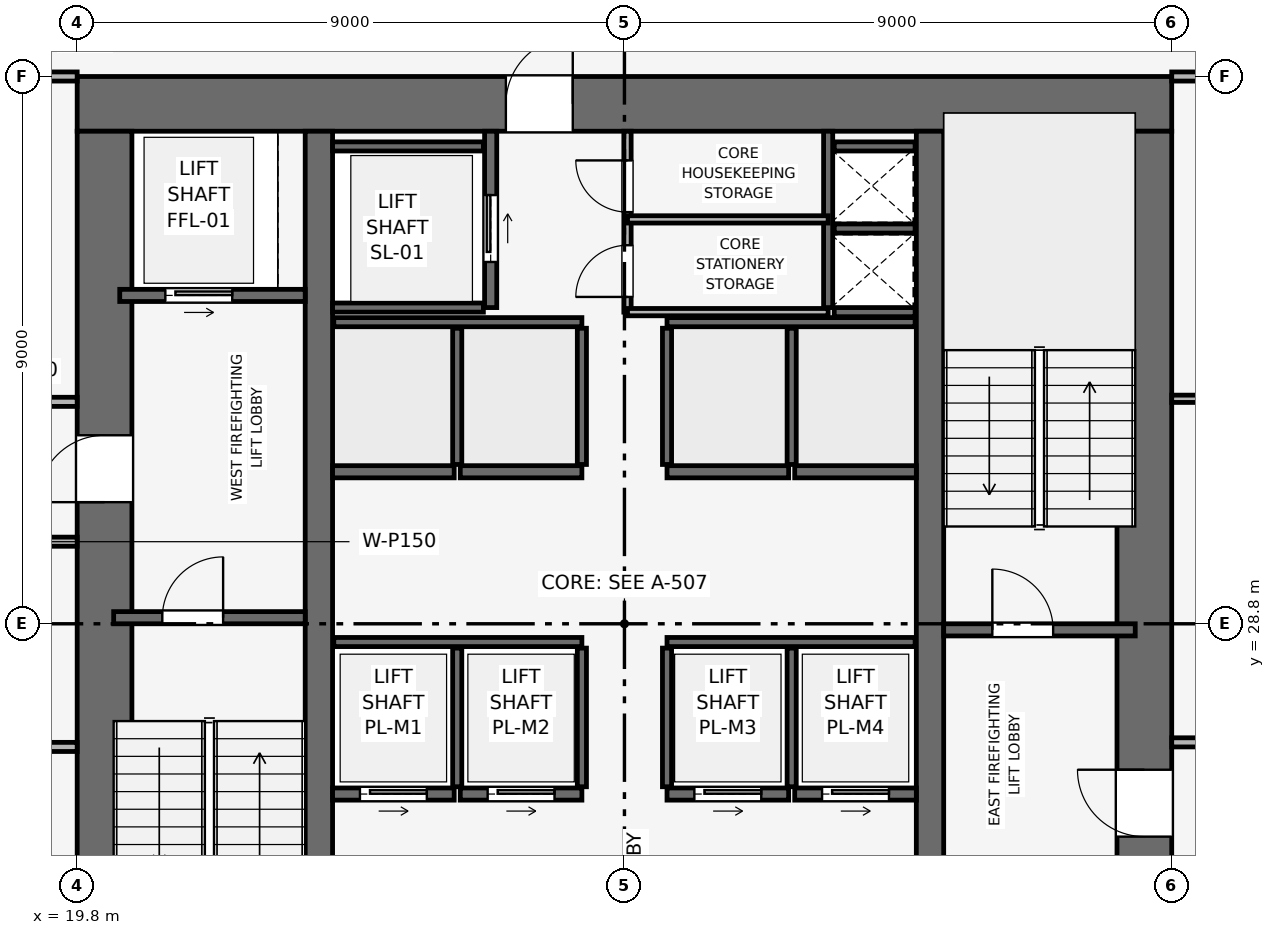
"""IFC4 building model, lengths in metres.
Left out: names, types, materials, properties, quantities, classifications, styles, units other than length and angle.
Written with IfcOpenShell. Run it as: python <this file> out.ifc"""

import sys

from ifc_helpers import new_model, si_unit, direction, frame, frame_2d, origin, place, context, subcontext, project, spatial, rectangle, extrude, element, fill, save


model = new_model("IFC4")
c1 = context("Model", 3, precision=1e-05, world=origin(), true_north=direction((0.0, 1.0)))
c2 = subcontext(c1, "Body", "Model", "MODEL_VIEW")
j1 = project(units=[si_unit("LENGTHUNIT", "METRE"), si_unit("PLANEANGLEUNIT", "RADIAN")], contexts=[c1])
p1 = place(None, origin())
s1 = spatial("IfcSite", under=j1, at=p1, CompositionType="ELEMENT")
p2 = place(p1, origin())
s2 = spatial("IfcBuilding", under=s1, at=p2, CompositionType="ELEMENT")
p3 = place(p2, frame((0.0, 0.0, 142.05)))
s3 = spatial("IfcBuildingStorey", under=s2, at=p3, CompositionType="ELEMENT", Elevation=142.05)
p4 = place(p3, frame((19.8, 37.35, 0.0), z_axis=(0.0, 0.0, 1.0), x_axis=(1.0, 0.0, 0.0)))
e1 = element("IfcWall", 1, at=p4, inside=s3, PredefinedType="SHEAR", context=c2, shape_type="SweptSolid", body=[
    extrude(rectangle(XDim=18.0, YDim=0.9, at=frame_2d((9.0, 0.0))), origin(), (0.0, 0.0, 1.0), 3.75),
])
p5 = place(p4, frame((7.05, 0.0, 0.0)))
e2 = element("IfcOpeningElement", 2, at=p5, cuts=e1, PredefinedType="OPENING", context=c2, shape_type="SweptSolid", body=[
    extrude(rectangle(XDim=1.1, YDim=2.15, at=frame_2d((0.55, 1.075))), frame((0.0, 0.46, 0.0), z_axis=(0.0, -1.0, 0.0), x_axis=(1.0, 0.0, 0.0)), (0.0, 0.0, 1.0), 0.92),
])
p6 = place(p3, frame((20.25, 20.7, 0.0), z_axis=(0.0, 0.0, 1.0), x_axis=(0.0, 1.0, 0.0)))
e3 = element("IfcWall", 3, at=p6, inside=s3, PredefinedType="SHEAR", context=c2, shape_type="SweptSolid", body=[
    extrude(rectangle(XDim=16.2, YDim=0.9, at=frame_2d((8.1, 0.0))), origin(), (0.0, 0.0, 1.0), 3.75),
])
p7 = place(p6, frame((10.1, 0.0, 0.0)))
e4 = element("IfcOpeningElement", 4, at=p7, cuts=e3, PredefinedType="OPENING", context=c2, shape_type="SweptSolid", body=[
    extrude(rectangle(XDim=1.1, YDim=2.15, at=frame_2d((0.55, 1.075))), frame((0.0, 0.46, 0.0), z_axis=(0.0, -1.0, 0.0), x_axis=(1.0, 0.0, 0.0)), (0.0, 0.0, 1.0), 0.92),
])
p8 = place(p3, frame((37.35, 20.7, 0.0), z_axis=(0.0, 0.0, 1.0), x_axis=(0.0, 1.0, 0.0)))
e5 = element("IfcWall", 5, at=p8, inside=s3, PredefinedType="SHEAR", context=c2, shape_type="SweptSolid", body=[
    extrude(rectangle(XDim=16.2, YDim=0.9, at=frame_2d((8.1, 0.0))), origin(), (0.0, 0.0, 1.0), 3.75),
])
p9 = place(p8, frame((4.6, 0.0, 0.0)))
e6 = element("IfcOpeningElement", 6, at=p9, cuts=e5, PredefinedType="OPENING", context=c2, shape_type="SweptSolid", body=[
    extrude(rectangle(XDim=1.1, YDim=2.15, at=frame_2d((0.55, 1.075))), frame((0.0, 0.46, 0.0), z_axis=(0.0, -1.0, 0.0), x_axis=(1.0, 0.0, 0.0)), (0.0, 0.0, 1.0), 0.92),
])
for number, where, z_axis, x_axis in (
    (7, (23.775, 20.7, 0.0), (0.0, 0.0, 1.0), (0.0, 1.0, 0.0)),
    (8, (33.825, 20.7, 0.0), (0.0, 0.0, 1.0), (0.0, 1.0, 0.0)),
):
    element("IfcWall", number, at=place(p3, frame(where, z_axis=z_axis, x_axis=x_axis)), inside=s3, PredefinedType="SHEAR", context=c2, shape_type="SweptSolid", body=[
        extrude(rectangle(XDim=16.2, YDim=0.45, at=frame_2d((8.1, 0.0))), origin(), (0.0, 0.0, 1.0), 3.75),
    ])
p10 = place(p3, frame((20.4, 28.9, 0.0), z_axis=(0.0, 0.0, 1.0), x_axis=(1.0, 0.0, 0.0)))
e9 = element("IfcWall", 9, at=p10, inside=s3, PredefinedType="SHEAR", context=c2, shape_type="SweptSolid", body=[
    extrude(rectangle(XDim=3.15, YDim=0.2, at=frame_2d((1.575, 0.0))), origin(), (0.0, 0.0, 1.0), 3.495),
])
p11 = place(p10, frame((0.8, 0.0, 0.0)))
e10 = element("IfcOpeningElement", 10, at=p11, cuts=e9, PredefinedType="OPENING", context=c2, shape_type="SweptSolid", body=[
    extrude(rectangle(XDim=1.0, YDim=2.1, at=frame_2d((0.5, 1.05))), frame((0.0, 0.11, 0.0), z_axis=(0.0, -1.0, 0.0), x_axis=(1.0, 0.0, 0.0)), (0.0, 0.0, 1.0), 0.22),
])
p12 = place(p3, frame((34.05, 28.7, 0.0), z_axis=(0.0, 0.0, 1.0), x_axis=(1.0, 0.0, 0.0)))
e11 = element("IfcWall", 11, at=p12, inside=s3, PredefinedType="SHEAR", context=c2, shape_type="SweptSolid", body=[
    extrude(rectangle(XDim=3.15, YDim=0.2, at=frame_2d((1.575, 0.0))), origin(), (0.0, 0.0, 1.0), 3.495),
])
p13 = place(p12, frame((0.8, 0.0, 0.0)))
e12 = element("IfcOpeningElement", 12, at=p13, cuts=e11, PredefinedType="OPENING", context=c2, shape_type="SweptSolid", body=[
    extrude(rectangle(XDim=1.0, YDim=2.1, at=frame_2d((0.5, 1.05))), frame((0.0, 0.11, 0.0), z_axis=(0.0, -1.0, 0.0), x_axis=(1.0, 0.0, 0.0)), (0.0, 0.0, 1.0), 0.22),
])
p14 = place(p3, frame((32.15, 34.0, 0.0), z_axis=(0.0, 0.0, 1.0), x_axis=(0.0, 1.0, 0.0)))
e13 = element("IfcWall", 13, at=p14, inside=s3, PredefinedType="SHEAR", context=c2, shape_type="SweptSolid", body=[
    extrude(rectangle(XDim=2.9, YDim=0.15, at=frame_2d((1.45, 0.0))), origin(), (0.0, 0.0, 1.0), 3.495),
])
for number, where, z_axis, x_axis in (
    (14, (32.25, 33.925, 0.0), (0.0, 0.0, 1.0), (1.0, 0.0, 0.0)),
    (15, (32.25, 35.3, 0.0), (0.0, 0.0, 1.0), (1.0, 0.0, 0.0)),
):
    element("IfcWall", number, at=place(p3, frame(where, z_axis=z_axis, x_axis=x_axis)), inside=s3, PredefinedType="SHEAR", context=c2, shape_type="SweptSolid", body=[
        extrude(rectangle(XDim=1.33, YDim=0.15, at=frame_2d((0.665, 0.0))), origin(), (0.0, 0.0, 1.0), 3.495),
    ])
p15 = place(p3, frame((20.5, 34.2, 0.0), z_axis=(0.0, 0.0, 1.0), x_axis=(1.0, 0.0, 0.0)))
e16 = element("IfcWall", 16, at=p15, inside=s3, PredefinedType="SHEAR", context=c2, shape_type="SweptSolid", body=[
    extrude(rectangle(XDim=3.05, YDim=0.2, at=frame_2d((1.525, 0.0))), origin(), (0.0, 0.0, 1.0), 3.495),
])
p16 = place(p15, frame((0.75, 0.0, 0.0)))
e17 = element("IfcOpeningElement", 17, at=p16, cuts=e16, PredefinedType="OPENING", context=c2, shape_type="SweptSolid", body=[
    extrude(rectangle(XDim=1.1, YDim=2.15, at=frame_2d((0.55, 1.075))), frame((0.0, 0.11, 0.0), z_axis=(0.0, -1.0, 0.0), x_axis=(1.0, 0.0, 0.0)), (0.0, 0.0, 1.0), 0.22),
])
p17 = place(p3, frame((26.6, 34.0, 0.0), z_axis=(0.0, 0.0, 1.0), x_axis=(0.0, 1.0, 0.0)))
e18 = element("IfcWall", 18, at=p17, inside=s3, PredefinedType="SHEAR", context=c2, shape_type="SweptSolid", body=[
    extrude(rectangle(XDim=2.9, YDim=0.2, at=frame_2d((1.45, 0.0))), origin(), (0.0, 0.0, 1.0), 3.495),
])
p18 = place(p17, frame((0.75, 0.0, 0.0)))
e19 = element("IfcOpeningElement", 19, at=p18, cuts=e18, PredefinedType="OPENING", context=c2, shape_type="SweptSolid", body=[
    extrude(rectangle(XDim=1.1, YDim=2.15, at=frame_2d((0.55, 1.075))), frame((0.0, 0.11, 0.0), z_axis=(0.0, -1.0, 0.0), x_axis=(1.0, 0.0, 0.0)), (0.0, 0.0, 1.0), 0.22),
])
for number, where, z_axis, x_axis in (
    (20, (24.0, 34.0, 0.0), (0.0, 0.0, 1.0), (1.0, 0.0, 0.0)),
    (21, (24.0, 36.65, 0.0), (0.0, 0.0, 1.0), (1.0, 0.0, 0.0)),
):
    element("IfcWall", number, at=place(p3, frame(where, z_axis=z_axis, x_axis=x_axis)), inside=s3, PredefinedType="SHEAR", context=c2, shape_type="SweptSolid", body=[
        extrude(rectangle(XDim=2.48, YDim=0.15, at=frame_2d((1.24, 0.0))), origin(), (0.0, 0.0, 1.0), 3.495),
    ])
p19 = place(p3, frame((24.0, 26.0, 0.0), z_axis=(0.0, 0.0, 1.0), x_axis=(1.0, 0.0, 0.0)))
e22 = element("IfcWall", 22, at=p19, inside=s3, PredefinedType="SHEAR", context=c2, shape_type="SweptSolid", body=[
    extrude(rectangle(XDim=2.0, YDim=0.2, at=frame_2d((1.0, 0.0))), origin(), (0.0, 0.0, 1.0), 3.495),
])
p20 = place(p19, frame((0.45, 0.0, 0.0)))
e23 = element("IfcOpeningElement", 23, at=p20, cuts=e22, PredefinedType="OPENING", context=c2, shape_type="SweptSolid", body=[
    extrude(rectangle(XDim=1.1, YDim=2.15, at=frame_2d((0.55, 1.075))), frame((0.0, 0.11, 0.0), z_axis=(0.0, -1.0, 0.0), x_axis=(1.0, 0.0, 0.0)), (0.0, 0.0, 1.0), 0.22),
])
p21 = place(p3, frame((26.1, 26.0, 0.0), z_axis=(0.0, 0.0, 1.0), x_axis=(1.0, 0.0, 0.0)))
e24 = element("IfcWall", 24, at=p21, inside=s3, PredefinedType="SHEAR", context=c2, shape_type="SweptSolid", body=[
    extrude(rectangle(XDim=2.0, YDim=0.2, at=frame_2d((1.0, 0.0))), origin(), (0.0, 0.0, 1.0), 3.495),
])
p22 = place(p21, frame((0.45, 0.0, 0.0)))
e25 = element("IfcOpeningElement", 25, at=p22, cuts=e24, PredefinedType="OPENING", context=c2, shape_type="SweptSolid", body=[
    extrude(rectangle(XDim=1.1, YDim=2.15, at=frame_2d((0.55, 1.075))), frame((0.0, 0.11, 0.0), z_axis=(0.0, -1.0, 0.0), x_axis=(1.0, 0.0, 0.0)), (0.0, 0.0, 1.0), 0.22),
])
p23 = place(p3, frame((29.5, 26.0, 0.0), z_axis=(0.0, 0.0, 1.0), x_axis=(1.0, 0.0, 0.0)))
e26 = element("IfcWall", 26, at=p23, inside=s3, PredefinedType="SHEAR", context=c2, shape_type="SweptSolid", body=[
    extrude(rectangle(XDim=2.0, YDim=0.2, at=frame_2d((1.0, 0.0))), origin(), (0.0, 0.0, 1.0), 3.495),
])
p24 = place(p23, frame((0.45, 0.0, 0.0)))
e27 = element("IfcOpeningElement", 27, at=p24, cuts=e26, PredefinedType="OPENING", context=c2, shape_type="SweptSolid", body=[
    extrude(rectangle(XDim=1.1, YDim=2.15, at=frame_2d((0.55, 1.075))), frame((0.0, 0.11, 0.0), z_axis=(0.0, -1.0, 0.0), x_axis=(1.0, 0.0, 0.0)), (0.0, 0.0, 1.0), 0.22),
])
p25 = place(p3, frame((31.6, 26.0, 0.0), z_axis=(0.0, 0.0, 1.0), x_axis=(1.0, 0.0, 0.0)))
e28 = element("IfcWall", 28, at=p25, inside=s3, PredefinedType="SHEAR", context=c2, shape_type="SweptSolid", body=[
    extrude(rectangle(XDim=2.0, YDim=0.2, at=frame_2d((1.0, 0.0))), origin(), (0.0, 0.0, 1.0), 3.495),
])
p26 = place(p25, frame((0.45, 0.0, 0.0)))
e29 = element("IfcOpeningElement", 29, at=p26, cuts=e28, PredefinedType="OPENING", context=c2, shape_type="SweptSolid", body=[
    extrude(rectangle(XDim=1.1, YDim=2.15, at=frame_2d((0.55, 1.075))), frame((0.0, 0.11, 0.0), z_axis=(0.0, -1.0, 0.0), x_axis=(1.0, 0.0, 0.0)), (0.0, 0.0, 1.0), 0.22),
])
for number, where, z_axis, x_axis in (
    (30, (24.0, 31.3, 0.0), (0.0, 0.0, 1.0), (1.0, 0.0, 0.0)),
    (31, (26.1, 31.3, 0.0), (0.0, 0.0, 1.0), (1.0, 0.0, 0.0)),
    (32, (29.5, 31.3, 0.0), (0.0, 0.0, 1.0), (1.0, 0.0, 0.0)),
    (33, (31.6, 31.3, 0.0), (0.0, 0.0, 1.0), (1.0, 0.0, 0.0)),
):
    element("IfcWall", number, at=place(p3, frame(where, z_axis=z_axis, x_axis=x_axis)), inside=s3, PredefinedType="SHEAR", context=c2, shape_type="SweptSolid", body=[
        extrude(rectangle(XDim=2.0, YDim=0.2, at=frame_2d((1.0, 0.0))), origin(), (0.0, 0.0, 1.0), 3.495),
    ])
p27 = place(p3, frame((32.25, 36.65, 0.0), z_axis=(0.0, 0.0, 1.0), x_axis=(1.0, 0.0, 0.0)))
e34 = element("IfcWall", 34, at=p27, inside=s3, PredefinedType="SHEAR", context=c2, shape_type="SweptSolid", body=[
    extrude(rectangle(XDim=1.33, YDim=0.15, at=frame_2d((0.665, 0.0))), origin(), (0.0, 0.0, 1.0), 3.495),
])
for number, where, z_axis, x_axis in (
    (35, (24.02, 28.5, 0.0), (0.0, 0.0, 1.0), (1.0, 0.0, 0.0)),
    (36, (29.5, 28.5, 0.0), (0.0, 0.0, 1.0), (1.0, 0.0, 0.0)),
):
    element("IfcWall", number, at=place(p3, frame(where, z_axis=z_axis, x_axis=x_axis)), inside=s3, PredefinedType="SHEAR", context=c2, shape_type="SweptSolid", body=[
        extrude(rectangle(XDim=4.08, YDim=0.15, at=frame_2d((2.04, 0.0))), origin(), (0.0, 0.0, 1.0), 3.495),
    ])
for number, where, z_axis, x_axis in (
    (37, (26.05, 26.12, 0.0), (0.0, 0.0, 1.0), (0.0, 1.0, 0.0)),
    (38, (28.1, 26.12, 0.0), (0.0, 0.0, 1.0), (0.0, 1.0, 0.0)),
    (39, (29.5, 26.12, 0.0), (0.0, 0.0, 1.0), (0.0, 1.0, 0.0)),
    (40, (31.55, 26.12, 0.0), (0.0, 0.0, 1.0), (0.0, 1.0, 0.0)),
):
    element("IfcWall", number, at=place(p3, frame(where, z_axis=z_axis, x_axis=x_axis)), inside=s3, PredefinedType="SHEAR", context=c2, shape_type="SweptSolid", body=[
        extrude(rectangle(XDim=2.28, YDim=0.15, at=frame_2d((1.14, 0.0))), origin(), (0.0, 0.0, 1.0), 3.495),
    ])
for number, where, z_axis, x_axis in (
    (41, (24.02, 33.76, 0.0), (0.0, 0.0, 1.0), (1.0, 0.0, 0.0)),
    (42, (29.5, 33.76, 0.0), (0.0, 0.0, 1.0), (1.0, 0.0, 0.0)),
):
    element("IfcWall", number, at=place(p3, frame(where, z_axis=z_axis, x_axis=x_axis)), inside=s3, PredefinedType="SHEAR", context=c2, shape_type="SweptSolid", body=[
        extrude(rectangle(XDim=4.08, YDim=0.15, at=frame_2d((2.04, 0.0))), origin(), (0.0, 0.0, 1.0), 3.495),
    ])
for number, where, z_axis, x_axis in (
    (43, (26.05, 31.42, 0.0), (0.0, 0.0, 1.0), (0.0, 1.0, 0.0)),
    (44, (28.1, 31.42, 0.0), (0.0, 0.0, 1.0), (0.0, 1.0, 0.0)),
    (45, (29.5, 31.42, 0.0), (0.0, 0.0, 1.0), (0.0, 1.0, 0.0)),
    (46, (31.55, 31.42, 0.0), (0.0, 0.0, 1.0), (0.0, 1.0, 0.0)),
):
    element("IfcWall", number, at=place(p3, frame(where, z_axis=z_axis, x_axis=x_axis)), inside=s3, PredefinedType="SHEAR", context=c2, shape_type="SweptSolid", body=[
        extrude(rectangle(XDim=2.24, YDim=0.15, at=frame_2d((1.12, 0.0))), origin(), (0.0, 0.0, 1.0), 3.495),
    ])
p28 = place(p3, frame((28.85, 33.925, 0.0), z_axis=(0.0, 0.0, 1.0), x_axis=(0.0, 1.0, 0.0)))
e47 = element("IfcWall", 47, at=p28, inside=s3, PredefinedType="PARTITIONING", context=c2, shape_type="SweptSolid", body=[
    extrude(rectangle(XDim=2.975, YDim=0.12, at=frame_2d((1.487, 0.0))), origin(), (0.0, 0.0, 1.0), 3.495),
])
p29 = place(p28, frame((0.25, 0.0, 0.0)))
e48 = element("IfcOpeningElement", 48, at=p29, cuts=e47, PredefinedType="OPENING", context=c2, shape_type="SweptSolid", body=[
    extrude(rectangle(XDim=0.85, YDim=2.1, at=frame_2d((0.425, 1.05))), frame((0.0, 0.07, 0.0), z_axis=(0.0, -1.0, 0.0), x_axis=(1.0, 0.0, 0.0)), (0.0, 0.0, 1.0), 0.14),
])
p30 = place(p28, frame((1.645, 0.0, 0.0)))
e49 = element("IfcOpeningElement", 49, at=p30, cuts=e47, PredefinedType="OPENING", context=c2, shape_type="SweptSolid", body=[
    extrude(rectangle(XDim=0.85, YDim=2.1, at=frame_2d((0.425, 1.05))), frame((0.0, 0.07, 0.0), z_axis=(0.0, -1.0, 0.0), x_axis=(1.0, 0.0, 0.0)), (0.0, 0.0, 1.0), 0.14),
])
for number, where, z_axis, x_axis in (
    (50, (28.85, 35.45, 0.0), (0.0, 0.0, 1.0), (1.0, 0.0, 0.0)),
    (51, (28.85, 33.925, 0.0), (0.0, 0.0, 1.0), (1.0, 0.0, 0.0)),
):
    element("IfcWall", number, at=place(p3, frame(where, z_axis=z_axis, x_axis=x_axis)), inside=s3, PredefinedType="PARTITIONING", context=c2, shape_type="SweptSolid", body=[
        extrude(rectangle(XDim=3.3, YDim=0.12, at=frame_2d((1.65, 0.0))), origin(), (0.0, 0.0, 1.0), 3.495),
    ])
for number, where, z_axis, x_axis in (
    (52, (15.4, 26.775, 0.0), (0.0, 0.0, 1.0), (1.0, 0.0, 0.0)),
    (53, (15.4, 30.15, 0.0), (0.0, 0.0, 1.0), (1.0, 0.0, 0.0)),
    (54, (15.4, 32.45, 0.0), (0.0, 0.0, 1.0), (1.0, 0.0, 0.0)),
):
    element("IfcWall", number, at=place(p3, frame(where, z_axis=z_axis, x_axis=x_axis)), inside=s3, PredefinedType="PARTITIONING", context=c2, shape_type="SweptSolid", body=[
        extrude(rectangle(XDim=4.4, YDim=0.15, at=frame_2d((2.2, 0.0))), origin(), (0.0, 0.0, 1.0), 3.495),
    ])
p31 = place(p3, frame((15.4, 37.8, 0.0), z_axis=(0.0, 0.0, 1.0), x_axis=(1.0, 0.0, 0.0)))
e55 = element("IfcWall", 55, at=p31, inside=s3, PredefinedType="PARTITIONING", context=c2, shape_type="SweptSolid", body=[
    extrude(rectangle(XDim=4.4, YDim=0.15, at=frame_2d((2.2, 0.0))), origin(), (0.0, 0.0, 1.0), 3.03),
])
p32 = place(p3, frame((37.8, 26.85, 0.0), z_axis=(0.0, 0.0, 1.0), x_axis=(1.0, 0.0, 0.0)))
e56 = element("IfcWall", 56, at=p32, inside=s3, PredefinedType="PARTITIONING", context=c2, shape_type="SweptSolid", body=[
    extrude(rectangle(XDim=2.25, YDim=0.15, at=frame_2d((1.125, 0.0))), origin(), (0.0, 0.0, 1.0), 3.495),
])
p33 = place(p3, frame((37.8, 32.5, 0.0), z_axis=(0.0, 0.0, 1.0), x_axis=(1.0, 0.0, 0.0)))
e57 = element("IfcWall", 57, at=p33, inside=s3, PredefinedType="PARTITIONING", context=c2, shape_type="SweptSolid", body=[
    extrude(rectangle(XDim=15.17, YDim=0.12, at=frame_2d((7.585, 0.0))), origin(), (0.0, 0.0, 1.0), 2.98),
])
p34 = place(p3, frame((37.8, 37.8, 0.0), z_axis=(0.0, 0.0, 1.0), x_axis=(1.0, 0.0, 0.0)))
e58 = element("IfcWall", 58, at=p34, inside=s3, PredefinedType="PARTITIONING", context=c2, shape_type="SweptSolid", body=[
    extrude(rectangle(XDim=15.17, YDim=0.15, at=frame_2d((7.585, 0.0))), origin(), (0.0, 0.0, 1.0), 2.98),
])
p35 = place(p34, frame((3.4, 0.0, 0.0)))
e59 = element("IfcOpeningElement", 59, at=p35, cuts=e58, PredefinedType="OPENING", context=c2, shape_type="SweptSolid", body=[
    extrude(rectangle(XDim=0.9, YDim=2.1, at=frame_2d((0.45, 1.05))), frame((0.0, 0.085, 0.0), z_axis=(0.0, -1.0, 0.0), x_axis=(1.0, 0.0, 0.0)), (0.0, 0.0, 1.0), 0.17),
])
p36 = place(p11, origin())
e60 = element("IfcDoor", 60, at=p36, inside=s3, OperationType="SINGLE_SWING_RIGHT", PredefinedType="DOOR", context=c2, shape_type="SweptSolid", body=[
    extrude(rectangle(XDim=1.0, YDim=2.1, at=frame_2d((0.5, 1.05))), frame((0.0, 0.025, 0.0), z_axis=(0.0, -1.0, 0.0), x_axis=(1.0, 0.0, 0.0)), (0.0, 0.0, 1.0), 0.05),
])
fill(e10, e60)
p37 = place(p13, origin())
e61 = element("IfcDoor", 61, at=p37, inside=s3, OperationType="SINGLE_SWING_LEFT", PredefinedType="DOOR", context=c2, shape_type="SweptSolid", body=[
    extrude(rectangle(XDim=1.0, YDim=2.1, at=frame_2d((0.5, 1.05))), frame((0.0, 0.025, 0.0), z_axis=(0.0, -1.0, 0.0), x_axis=(1.0, 0.0, 0.0)), (0.0, 0.0, 1.0), 0.05),
])
fill(e12, e61)
p38 = place(p16, origin())
e62 = element("IfcDoor", 62, at=p38, inside=s3, OperationType="SLIDING_TO_RIGHT", PredefinedType="DOOR", context=c2, shape_type="SweptSolid", body=[
    extrude(rectangle(XDim=1.1, YDim=2.15, at=frame_2d((0.55, 1.075))), frame((0.0, 0.025, 0.0), z_axis=(0.0, -1.0, 0.0), x_axis=(1.0, 0.0, 0.0)), (0.0, 0.0, 1.0), 0.05),
])
fill(e17, e62)
p39 = place(p18, origin())
e63 = element("IfcDoor", 63, at=p39, inside=s3, OperationType="SLIDING_TO_RIGHT", PredefinedType="DOOR", context=c2, shape_type="SweptSolid", body=[
    extrude(rectangle(XDim=1.1, YDim=2.15, at=frame_2d((0.55, 1.075))), frame((0.0, 0.025, 0.0), z_axis=(0.0, -1.0, 0.0), x_axis=(1.0, 0.0, 0.0)), (0.0, 0.0, 1.0), 0.05),
])
fill(e19, e63)
p40 = place(p20, origin())
e64 = element("IfcDoor", 64, at=p40, inside=s3, OperationType="SLIDING_TO_RIGHT", PredefinedType="DOOR", context=c2, shape_type="SweptSolid", body=[
    extrude(rectangle(XDim=1.1, YDim=2.15, at=frame_2d((0.55, 1.075))), frame((0.0, 0.025, 0.0), z_axis=(0.0, -1.0, 0.0), x_axis=(1.0, 0.0, 0.0)), (0.0, 0.0, 1.0), 0.05),
])
fill(e23, e64)
p41 = place(p22, origin())
e65 = element("IfcDoor", 65, at=p41, inside=s3, OperationType="SLIDING_TO_RIGHT", PredefinedType="DOOR", context=c2, shape_type="SweptSolid", body=[
    extrude(rectangle(XDim=1.1, YDim=2.15, at=frame_2d((0.55, 1.075))), frame((0.0, 0.025, 0.0), z_axis=(0.0, -1.0, 0.0), x_axis=(1.0, 0.0, 0.0)), (0.0, 0.0, 1.0), 0.05),
])
fill(e25, e65)
p42 = place(p24, origin())
e66 = element("IfcDoor", 66, at=p42, inside=s3, OperationType="SLIDING_TO_RIGHT", PredefinedType="DOOR", context=c2, shape_type="SweptSolid", body=[
    extrude(rectangle(XDim=1.1, YDim=2.15, at=frame_2d((0.55, 1.075))), frame((0.0, 0.025, 0.0), z_axis=(0.0, -1.0, 0.0), x_axis=(1.0, 0.0, 0.0)), (0.0, 0.0, 1.0), 0.05),
])
fill(e27, e66)
p43 = place(p26, origin())
e67 = element("IfcDoor", 67, at=p43, inside=s3, OperationType="SLIDING_TO_RIGHT", PredefinedType="DOOR", context=c2, shape_type="SweptSolid", body=[
    extrude(rectangle(XDim=1.1, YDim=2.15, at=frame_2d((0.55, 1.075))), frame((0.0, 0.025, 0.0), z_axis=(0.0, -1.0, 0.0), x_axis=(1.0, 0.0, 0.0)), (0.0, 0.0, 1.0), 0.05),
])
fill(e29, e67)
p44 = place(p29, origin())
e68 = element("IfcDoor", 68, at=p44, inside=s3, OperationType="SINGLE_SWING_LEFT", PredefinedType="DOOR", context=c2, shape_type="SweptSolid", body=[
    extrude(rectangle(XDim=0.85, YDim=2.1, at=frame_2d((0.425, 1.05))), frame((0.0, 0.025, 0.0), z_axis=(0.0, -1.0, 0.0), x_axis=(1.0, 0.0, 0.0)), (0.0, 0.0, 1.0), 0.05),
])
fill(e48, e68)
p45 = place(p30, origin())
e69 = element("IfcDoor", 69, at=p45, inside=s3, OperationType="SINGLE_SWING_RIGHT", PredefinedType="DOOR", context=c2, shape_type="SweptSolid", body=[
    extrude(rectangle(XDim=0.85, YDim=2.1, at=frame_2d((0.425, 1.05))), frame((0.0, 0.025, 0.0), z_axis=(0.0, -1.0, 0.0), x_axis=(1.0, 0.0, 0.0)), (0.0, 0.0, 1.0), 0.05),
])
fill(e49, e69)
p46 = place(p7, origin())
e70 = element("IfcDoor", 70, at=p46, inside=s3, OperationType="SINGLE_SWING_LEFT", PredefinedType="DOOR", context=c2, shape_type="SweptSolid", body=[
    extrude(rectangle(XDim=1.1, YDim=2.15, at=frame_2d((0.55, 1.075))), frame((0.0, 0.025, 0.0), z_axis=(0.0, -1.0, 0.0), x_axis=(1.0, 0.0, 0.0)), (0.0, 0.0, 1.0), 0.05),
])
fill(e4, e70)
p47 = place(p9, origin())
e71 = element("IfcDoor", 71, at=p47, inside=s3, OperationType="SINGLE_SWING_RIGHT", PredefinedType="DOOR", context=c2, shape_type="SweptSolid", body=[
    extrude(rectangle(XDim=1.1, YDim=2.15, at=frame_2d((0.55, 1.075))), frame((0.0, 0.025, 0.0), z_axis=(0.0, -1.0, 0.0), x_axis=(1.0, 0.0, 0.0)), (0.0, 0.0, 1.0), 0.05),
])
fill(e6, e71)
p48 = place(p5, origin())
e72 = element("IfcDoor", 72, at=p48, inside=s3, OperationType="SINGLE_SWING_RIGHT", PredefinedType="DOOR", context=c2, shape_type="SweptSolid", body=[
    extrude(rectangle(XDim=1.1, YDim=2.15, at=frame_2d((0.55, 1.075))), frame((0.0, 0.025, 0.0), z_axis=(0.0, -1.0, 0.0), x_axis=(1.0, 0.0, 0.0)), (0.0, 0.0, 1.0), 0.05),
])
fill(e2, e72)
save(model, sys.argv[1])
